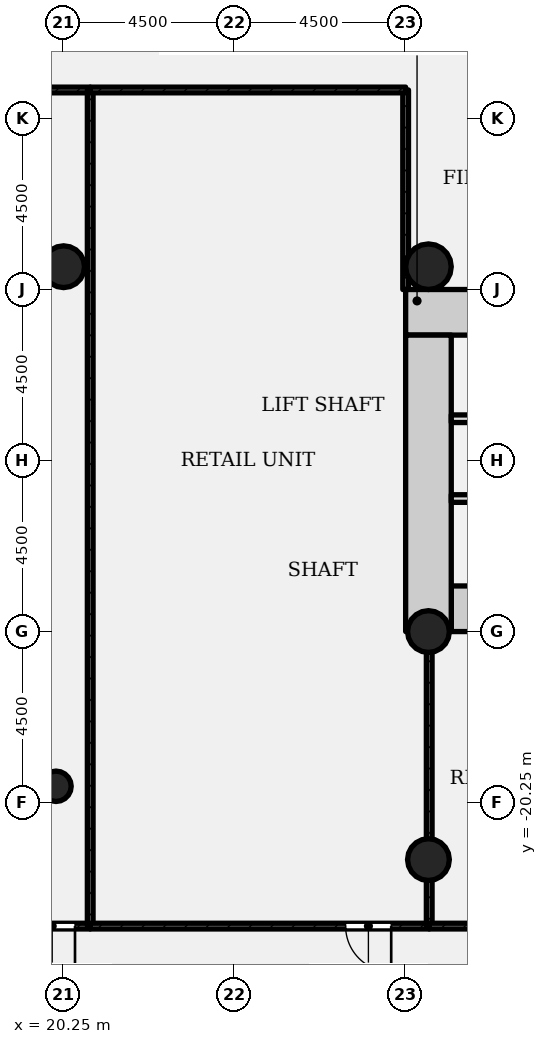
"""IFC4 building model, lengths in metres.
Left out: names, types, materials, properties, quantities, classifications, styles, units other than length and angle.
Written with IfcOpenShell. Run it as: python <this file> out.ifc"""

import sys

from ifc_helpers import new_model, si_unit, direction, frame, frame_2d, origin, origin_2d, place, context, subcontext, project, spatial, rectangle, hollow_circle, extrude, element, fill, save


model = new_model("IFC4")
c1 = context("Model", 3, precision=1e-05, world=origin(), true_north=direction((0.0, 1.0)))
c2 = subcontext(c1, "Body", "Model", "MODEL_VIEW")
j1 = project(units=[si_unit("LENGTHUNIT", "METRE"), si_unit("PLANEANGLEUNIT", "RADIAN")], contexts=[c1])
p1 = place(None, origin())
s1 = spatial("IfcSite", under=j1, at=p1, CompositionType="ELEMENT")
p2 = place(p1, origin())
s2 = spatial("IfcBuilding", under=s1, at=p2, CompositionType="ELEMENT")
p3 = place(p2, origin())
s3 = spatial("IfcBuildingStorey", under=s2, at=p3, CompositionType="ELEMENT", Elevation=0.0)
p4 = place(p3, frame((30.45, -15.15, -0.4), z_axis=(0.0, 0.0, 1.0), x_axis=(1.0, 0.0, 0.0)))
e1 = element("IfcWall", 1, at=p4, inside=s3, PredefinedType="SHEAR", context=c2, shape_type="SweptSolid", body=[
    extrude(rectangle(XDim=12.3, YDim=1.2, at=frame_2d((6.15, 0.0))), origin(), (0.0, 0.0, 1.0), 6.4),
])
p5 = place(p4, frame((4.65, 0.0, 0.4)))
e2 = element("IfcOpeningElement", 2, at=p5, cuts=e1, PredefinedType="OPENING", context=c2, shape_type="SweptSolid", body=[
    extrude(rectangle(XDim=1.8, YDim=2.1, at=frame_2d((0.9, 1.05))), frame((0.0, 0.61, 0.0), z_axis=(0.0, -1.0, 0.0), x_axis=(1.0, 0.0, 0.0)), (0.0, 0.0, 1.0), 1.22),
])
p6 = place(p3, frame((41.55, -7.35, -0.4), z_axis=(0.0, 0.0, 1.0), x_axis=(-1.0, 0.0, 0.0)))
e3 = element("IfcWall", 3, at=p6, inside=s3, PredefinedType="SHEAR", context=c2, shape_type="SweptSolid", body=[
    extrude(rectangle(XDim=12.3, YDim=1.2, at=frame_2d((6.15, 0.0))), origin(), (0.0, 0.0, 1.0), 6.4),
])
p7 = place(p6, frame((4.65, 0.0, 0.4)))
e4 = element("IfcOpeningElement", 4, at=p7, cuts=e3, PredefinedType="OPENING", context=c2, shape_type="SweptSolid", body=[
    extrude(rectangle(XDim=1.8, YDim=2.1, at=frame_2d((0.9, 1.05))), frame((0.0, 0.61, 0.0), z_axis=(0.0, -1.0, 0.0), x_axis=(1.0, 0.0, 0.0)), (0.0, 0.0, 1.0), 1.22),
])
p8 = place(p3, frame((29.85, -7.95, -0.4), z_axis=(0.0, 0.0, 1.0), x_axis=(0.0, -1.0, 0.0)))
e5 = element("IfcWall", 5, at=p8, inside=s3, PredefinedType="SHEAR", context=c2, shape_type="SweptSolid", body=[
    extrude(rectangle(XDim=7.8, YDim=1.2, at=frame_2d((3.9, 0.0))), origin(), (0.0, 0.0, 1.0), 6.4),
])
for number, where, z_axis, x_axis in (
    (6, (20.25, -6.15, -0.4), (0.0, 0.0, 1.0), (1.0, 0.0, 0.0)),
    (7, (29.85, -15.75, -0.4), (0.0, 0.0, 1.0), (1.0, 0.0, 0.0)),
    (8, (29.85, -21.75, -0.4), (0.0, 0.0, 1.0), (1.0, 0.0, 0.0)),
):
    element("IfcColumn", number, at=place(p3, frame(where, z_axis=z_axis, x_axis=x_axis)), inside=s3, PredefinedType="COLUMN", context=c2, shape_type="SweptSolid", body=[
        extrude(hollow_circle(Radius=0.55, WallThickness=0.04, at=origin_2d()), origin(), (0.0, 0.0, 1.0), 6.4),
    ])
p9 = place(p3, frame((29.85, -6.15, -0.4), z_axis=(0.0, 0.0, 1.0), x_axis=(1.0, 0.0, 0.0)))
e9 = element("IfcColumn", 9, at=p9, inside=s3, PredefinedType="COLUMN", context=c2, shape_type="SweptSolid", body=[
    extrude(hollow_circle(Radius=0.6, WallThickness=0.045, at=origin_2d()), origin(), (0.0, 0.0, 1.0), 6.4),
])
p10 = place(p3, frame((20.05, -19.821, -0.4), z_axis=(0.0, 0.0, 1.0), x_axis=(1.0, 0.0, 0.0)))
e10 = element("IfcColumn", 10, at=p10, inside=s3, PredefinedType="COLUMN", context=c2, shape_type="SweptSolid", body=[
    extrude(hollow_circle(Radius=0.4, WallThickness=0.028, at=origin_2d()), origin(), (0.0, 0.0, 1.0), 6.4),
])
for number, where, z_axis, x_axis in (
    (11, (30.45, -10.15, 0.0), (0.0, 0.0, 1.0), (1.0, 0.0, 0.0)),
    (12, (30.45, -12.25, 0.0), (0.0, 0.0, 1.0), (1.0, 0.0, 0.0)),
):
    element("IfcWall", number, at=place(p3, frame(where, z_axis=z_axis, x_axis=x_axis)), inside=s3, PredefinedType="SOLIDWALL", context=c2, shape_type="SweptSolid", body=[
        extrude(rectangle(XDim=3.65, YDim=0.2, at=frame_2d((1.825, 0.0))), origin(), (0.0, 0.0, 1.0), 5.58),
    ])
p11 = place(p3, frame((20.95, -23.5, 0.0), z_axis=(0.0, 0.0, 1.0), x_axis=(-1.0, 0.0, 0.0)))
e13 = element("IfcWall", 13, at=p11, inside=s3, PredefinedType="PARTITIONING", context=c2, shape_type="SweptSolid", body=[
    extrude(rectangle(XDim=8.92, YDim=0.15, at=frame_2d((4.46, 0.0))), origin(), (0.0, 0.0, 1.0), 5.58),
])
p12 = place(p11, frame((0.4, 0.0, 0.0)))
e14 = element("IfcOpeningElement", 14, at=p12, cuts=e13, PredefinedType="OPENING", context=c2, shape_type="SweptSolid", body=[
    extrude(rectangle(XDim=1.2, YDim=2.1, at=frame_2d((0.6, 1.05))), frame((0.0, 0.085, 0.0), z_axis=(0.0, -1.0, 0.0), x_axis=(1.0, 0.0, 0.0)), (0.0, 0.0, 1.0), 0.17),
])
p13 = place(p3, frame((12.03, -1.5, 0.0), z_axis=(0.0, 0.0, 1.0), x_axis=(1.0, 0.0, 0.0)))
e15 = element("IfcWall", 15, at=p13, inside=s3, PredefinedType="PARTITIONING", context=c2, shape_type="SweptSolid", body=[
    extrude(rectangle(XDim=8.92, YDim=0.15, at=frame_2d((4.46, 0.0))), origin(), (0.0, 0.0, 1.0), 5.58),
])
p14 = place(p3, frame((20.95, -1.5, 0.0), z_axis=(0.0, 0.0, 1.0), x_axis=(0.0, -1.0, 0.0)))
e16 = element("IfcWall", 16, at=p14, inside=s3, PredefinedType="PARTITIONING", context=c2, shape_type="SweptSolid", body=[
    extrude(rectangle(XDim=22.0, YDim=0.15, at=frame_2d((11.0, 0.0))), origin(), (0.0, 0.0, 1.0), 5.58),
])
p15 = place(p3, frame((29.25, -1.5, 0.0), z_axis=(0.0, 0.0, 1.0), x_axis=(0.0, -1.0, 0.0)))
e17 = element("IfcWall", 17, at=p15, inside=s3, PredefinedType="PARTITIONING", context=c2, shape_type="SweptSolid", body=[
    extrude(rectangle(XDim=5.25, YDim=0.15, at=frame_2d((2.625, 0.0))), origin(), (0.0, 0.0, 1.0), 5.58),
])
p16 = place(p3, frame((29.87, -23.5, 0.0), z_axis=(0.0, 0.0, 1.0), x_axis=(-1.0, 0.0, 0.0)))
e18 = element("IfcWall", 18, at=p16, inside=s3, PredefinedType="PARTITIONING", context=c2, shape_type="SweptSolid", body=[
    extrude(rectangle(XDim=8.92, YDim=0.15, at=frame_2d((4.46, 0.0))), origin(), (0.0, 0.0, 1.0), 5.58),
])
p17 = place(p16, frame((1.0, 0.0, 0.0)))
e19 = element("IfcOpeningElement", 19, at=p17, cuts=e18, PredefinedType="OPENING", context=c2, shape_type="SweptSolid", body=[
    extrude(rectangle(XDim=1.2, YDim=2.1, at=frame_2d((0.6, 1.05))), frame((0.0, 0.085, 0.0), z_axis=(0.0, -1.0, 0.0), x_axis=(1.0, 0.0, 0.0)), (0.0, 0.0, 1.0), 0.17),
])
p18 = place(p3, frame((20.95, -1.5, 0.0), z_axis=(0.0, 0.0, 1.0), x_axis=(1.0, 0.0, 0.0)))
e20 = element("IfcWall", 20, at=p18, inside=s3, PredefinedType="PARTITIONING", context=c2, shape_type="SweptSolid", body=[
    extrude(rectangle(XDim=8.3, YDim=0.15, at=frame_2d((4.15, 0.0))), origin(), (0.0, 0.0, 1.0), 5.58),
])
p19 = place(p3, frame((29.87, -15.75, 0.0), z_axis=(0.0, 0.0, 1.0), x_axis=(0.0, -1.0, 0.0)))
e21 = element("IfcWall", 21, at=p19, inside=s3, PredefinedType="PARTITIONING", context=c2, shape_type="SweptSolid", body=[
    extrude(rectangle(XDim=7.75, YDim=0.15, at=frame_2d((3.875, 0.0))), origin(), (0.0, 0.0, 1.0), 5.58),
])
p20 = place(p3, frame((34.5, -23.5, 0.0), z_axis=(0.0, 0.0, 1.0), x_axis=(-1.0, 0.0, 0.0)))
e22 = element("IfcWall", 22, at=p20, inside=s3, PredefinedType="PARTITIONING", context=c2, shape_type="SweptSolid", body=[
    extrude(rectangle(XDim=4.63, YDim=0.15, at=frame_2d((2.315, 0.0))), origin(), (0.0, 0.0, 1.0), 5.58),
])
p21 = place(p12, origin())
e23 = element("IfcDoor", 23, at=p21, inside=s3, OperationType="SINGLE_SWING_RIGHT", PredefinedType="DOOR", context=c2, shape_type="SweptSolid", body=[
    extrude(rectangle(XDim=1.2, YDim=2.1, at=frame_2d((0.6, 1.05))), frame((0.0, 0.025, 0.0), z_axis=(0.0, -1.0, 0.0), x_axis=(1.0, 0.0, 0.0)), (0.0, 0.0, 1.0), 0.05),
])
fill(e14, e23)
p22 = place(p17, origin())
e24 = element("IfcDoor", 24, at=p22, inside=s3, OperationType="SINGLE_SWING_RIGHT", PredefinedType="DOOR", context=c2, shape_type="SweptSolid", body=[
    extrude(rectangle(XDim=1.2, YDim=2.1, at=frame_2d((0.6, 1.05))), frame((0.0, 0.025, 0.0), z_axis=(0.0, -1.0, 0.0), x_axis=(1.0, 0.0, 0.0)), (0.0, 0.0, 1.0), 0.05),
])
fill(e19, e24)
save(model, sys.argv[1])
